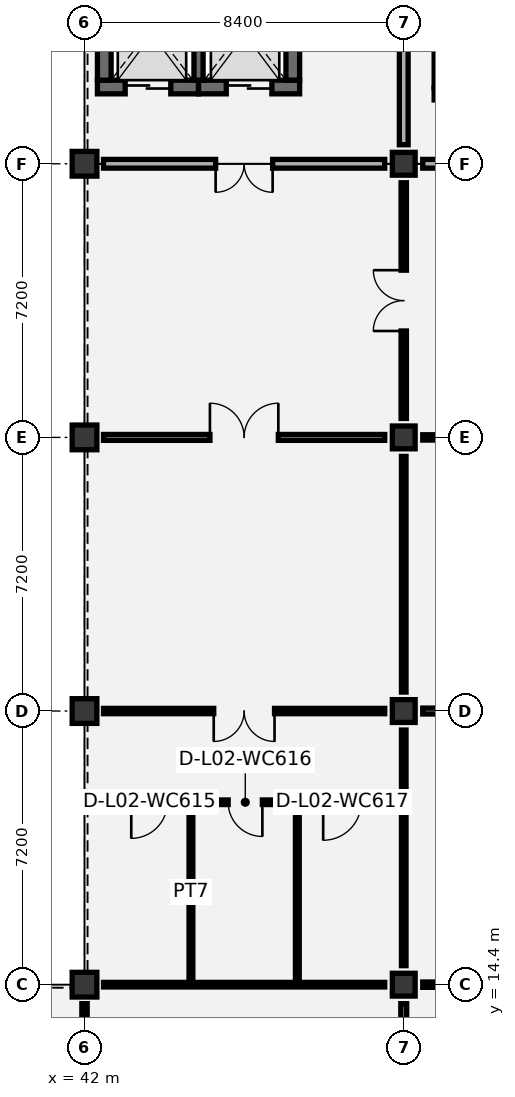
"""IFC4 building model, lengths in metres.
Left out: names, types, materials, properties, quantities, classifications, styles, units other than length and angle.
Written with IfcOpenShell. Run it as: python <this file> out.ifc"""

import sys

from ifc_helpers import new_model, si_unit, direction, frame, frame_2d, origin, origin_2d, place, context, subcontext, project, spatial, rectangle, extrude, element, fill, save


model = new_model("IFC4")
c1 = context("Model", 3, precision=1e-05, world=origin(), true_north=direction((0.0, 1.0)))
c2 = subcontext(c1, "Body", "Model", "MODEL_VIEW")
j1 = project(units=[si_unit("LENGTHUNIT", "METRE"), si_unit("PLANEANGLEUNIT", "RADIAN")], contexts=[c1])
p1 = place(None, origin())
s1 = spatial("IfcSite", under=j1, at=p1, CompositionType="ELEMENT")
p2 = place(p1, origin())
s2 = spatial("IfcBuilding", under=s1, at=p2, CompositionType="ELEMENT")
p3 = place(p2, frame((0.0, 0.0, 11.4)))
s3 = spatial("IfcBuildingStorey", under=s2, at=p3, CompositionType="ELEMENT", Elevation=11.4)
for number, where, z_axis, x_axis in (
    (1, (42.0, 14.4, 0.0), (0.0, 0.0, 1.0), (1.0, 0.0, 0.0)),
    (2, (42.0, 21.6, 0.0), (0.0, 0.0, 1.0), (1.0, 0.0, 0.0)),
    (3, (42.0, 28.8, 0.0), (0.0, 0.0, 1.0), (1.0, 0.0, 0.0)),
    (4, (42.0, 36.0, 0.0), (0.0, 0.0, 1.0), (1.0, 0.0, 0.0)),
):
    element("IfcColumn", number, at=place(p3, frame(where, z_axis=z_axis, x_axis=x_axis)), inside=s3, PredefinedType="COLUMN", context=c2, shape_type="SweptSolid", body=[
        extrude(rectangle(XDim=0.65, YDim=0.65, at=origin_2d()), origin(), (0.0, 0.0, 1.0), 5.4),
    ])
for number, where, z_axis, x_axis in (
    (5, (50.4, 14.4, 0.0), (0.0, 0.0, 1.0), (1.0, 0.0, 0.0)),
    (6, (50.4, 21.6, 0.0), (0.0, 0.0, 1.0), (1.0, 0.0, 0.0)),
    (7, (50.4, 28.8, 0.0), (0.0, 0.0, 1.0), (1.0, 0.0, 0.0)),
    (8, (50.4, 36.0, 0.0), (0.0, 0.0, 1.0), (1.0, 0.0, 0.0)),
):
    element("IfcColumn", number, at=place(p3, frame(where, z_axis=z_axis, x_axis=x_axis)), inside=s3, PredefinedType="COLUMN", context=c2, shape_type="SweptSolid", body=[
        extrude(rectangle(XDim=0.6, YDim=0.6, at=origin_2d()), origin(), (0.0, 0.0, 1.0), 5.4),
    ])
p4 = place(p3, frame((51.2, 37.84, 0.0), z_axis=(0.0, 0.0, 1.0), x_axis=(1.0, 0.0, 0.0)))
e9 = element("IfcWall", 9, at=p4, inside=s3, PredefinedType="SHEAR", context=c2, shape_type="SweptSolid", body=[
    extrude(rectangle(XDim=7.48, YDim=0.32, at=frame_2d((3.74, 0.0))), origin(), (0.0, 0.0, 1.0), 5.1),
])
p5 = place(p4, frame((0.45, 0.0, 0.0)))
e10 = element("IfcOpeningElement", 10, at=p5, cuts=e9, PredefinedType="OPENING", context=c2, shape_type="SweptSolid", body=[
    extrude(rectangle(XDim=1.05, YDim=2.15, at=frame_2d((0.525, 1.075))), frame((0.0, 0.17, 0.0), z_axis=(0.0, -1.0, 0.0), x_axis=(1.0, 0.0, 0.0)), (0.0, 0.0, 1.0), 0.34),
])
p6 = place(p3, frame((51.36, 38.0, 0.0), z_axis=(0.0, 0.0, 1.0), x_axis=(0.0, 1.0, 0.0)))
e11 = element("IfcWall", 11, at=p6, inside=s3, PredefinedType="SHEAR", context=c2, shape_type="SweptSolid", body=[
    extrude(rectangle(XDim=3.8, YDim=0.32, at=frame_2d((1.9, 0.0))), origin(), (0.0, 0.0, 1.0), 5.1),
])
p7 = place(p3, frame((42.34, 38.02, 0.0), z_axis=(0.0, 0.0, 1.0), x_axis=(1.0, 0.0, 0.0)))
e12 = element("IfcWall", 12, at=p7, inside=s3, PredefinedType="SHEAR", context=c2, shape_type="SweptSolid", body=[
    extrude(rectangle(XDim=2.66, YDim=0.36, at=frame_2d((1.33, 0.0))), origin(), (0.0, 0.0, 1.0), 5.1),
])
p8 = place(p7, frame((0.73, 0.0, 0.0)))
e13 = element("IfcOpeningElement", 13, at=p8, cuts=e12, PredefinedType="OPENING", context=c2, shape_type="SweptSolid", body=[
    extrude(rectangle(XDim=1.2, YDim=2.15, at=frame_2d((0.6, 1.075))), frame((0.0, 0.19, 0.0), z_axis=(0.0, -1.0, 0.0), x_axis=(1.0, 0.0, 0.0)), (0.0, 0.0, 1.0), 0.38),
])
p9 = place(p3, frame((45.0, 38.02, 0.0), z_axis=(0.0, 0.0, 1.0), x_axis=(1.0, 0.0, 0.0)))
e14 = element("IfcWall", 14, at=p9, inside=s3, PredefinedType="SHEAR", context=c2, shape_type="SweptSolid", body=[
    extrude(rectangle(XDim=2.66, YDim=0.36, at=frame_2d((1.33, 0.0))), origin(), (0.0, 0.0, 1.0), 5.1),
])
p10 = place(p9, frame((0.73, 0.0, 0.0)))
e15 = element("IfcOpeningElement", 15, at=p10, cuts=e14, PredefinedType="OPENING", context=c2, shape_type="SweptSolid", body=[
    extrude(rectangle(XDim=1.2, YDim=2.15, at=frame_2d((0.6, 1.075))), frame((0.0, 0.19, 0.0), z_axis=(0.0, -1.0, 0.0), x_axis=(1.0, 0.0, 0.0)), (0.0, 0.0, 1.0), 0.38),
])
for number, where, z_axis, x_axis in (
    (16, (42.52, 38.2, 0.0), (0.0, 0.0, 1.0), (0.0, 1.0, 0.0)),
    (17, (47.48, 38.2, 0.0), (0.0, 0.0, 1.0), (0.0, 1.0, 0.0)),
):
    element("IfcWall", number, at=place(p3, frame(where, z_axis=z_axis, x_axis=x_axis)), inside=s3, PredefinedType="SHEAR", context=c2, shape_type="SweptSolid", body=[
        extrude(rectangle(XDim=2.8, YDim=0.36, at=frame_2d((1.4, 0.0))), origin(), (0.0, 0.0, 1.0), 5.1),
    ])
p11 = place(p3, frame((45.0, 38.2, 0.0), z_axis=(0.0, 0.0, 1.0), x_axis=(0.0, 1.0, 0.0)))
e18 = element("IfcWall", 18, at=p11, inside=s3, PredefinedType="SHEAR", context=c2, shape_type="SweptSolid", body=[
    extrude(rectangle(XDim=2.8, YDim=0.24, at=frame_2d((1.4, 0.0))), origin(), (0.0, 0.0, 1.0), 5.1),
])
p12 = place(p3, frame((42.15, 19.2, 0.0), z_axis=(0.0, 0.0, 1.0), x_axis=(1.0, 0.0, 0.0)))
e19 = element("IfcWall", 19, at=p12, inside=s3, PredefinedType="PARTITIONING", context=c2, shape_type="SweptSolid", body=[
    extrude(rectangle(XDim=8.1, YDim=0.12, at=frame_2d((4.05, 0.0))), origin(), (0.0, 0.0, 1.0), 5.1),
])
p13 = place(p12, frame((1.08, 0.0, 0.0)))
e20 = element("IfcOpeningElement", 20, at=p13, cuts=e19, PredefinedType="OPENING", context=c2, shape_type="SweptSolid", body=[
    extrude(rectangle(XDim=0.95, YDim=2.1, at=frame_2d((0.475, 1.05))), frame((0.0, 0.07, 0.0), z_axis=(0.0, -1.0, 0.0), x_axis=(1.0, 0.0, 0.0)), (0.0, 0.0, 1.0), 0.14),
])
p14 = place(p12, frame((3.63, 0.0, 0.0)))
e21 = element("IfcOpeningElement", 21, at=p14, cuts=e19, PredefinedType="OPENING", context=c2, shape_type="SweptSolid", body=[
    extrude(rectangle(XDim=0.9, YDim=2.1, at=frame_2d((0.45, 1.05))), frame((0.0, 0.07, 0.0), z_axis=(0.0, -1.0, 0.0), x_axis=(1.0, 0.0, 0.0)), (0.0, 0.0, 1.0), 0.14),
])
p15 = place(p12, frame((6.13, 0.0, 0.0)))
e22 = element("IfcOpeningElement", 22, at=p15, cuts=e19, PredefinedType="OPENING", context=c2, shape_type="SweptSolid", body=[
    extrude(rectangle(XDim=1.0, YDim=2.1, at=frame_2d((0.5, 1.05))), frame((0.0, 0.07, 0.0), z_axis=(0.0, -1.0, 0.0), x_axis=(1.0, 0.0, 0.0)), (0.0, 0.0, 1.0), 0.14),
])
for number, where, z_axis, x_axis in (
    (23, (44.8, 14.55, 0.0), (0.0, 0.0, 1.0), (0.0, 1.0, 0.0)),
    (24, (47.6, 14.55, 0.0), (0.0, 0.0, 1.0), (0.0, 1.0, 0.0)),
):
    element("IfcWall", number, at=place(p3, frame(where, z_axis=z_axis, x_axis=x_axis)), inside=s3, PredefinedType="PARTITIONING", context=c2, shape_type="SweptSolid", body=[
        extrude(rectangle(XDim=4.59, YDim=0.1, at=frame_2d((2.295, 0.0))), origin(), (0.0, 0.0, 1.0), 5.1),
    ])
p16 = place(p3, frame((42.0, 7.7, 0.0), z_axis=(0.0, 0.0, 1.0), x_axis=(0.0, 1.0, 0.0)))
e25 = element("IfcWall", 25, at=p16, inside=s3, PredefinedType="PARTITIONING", context=c2, shape_type="SweptSolid", body=[
    extrude(rectangle(XDim=6.2, YDim=0.14, at=frame_2d((3.1, 0.0))), origin(), (0.0, 0.0, 1.0), 4.805),
])
p17 = place(p16, frame((2.2, 0.0, 0.0)))
e26 = element("IfcOpeningElement", 26, at=p17, cuts=e25, PredefinedType="OPENING", context=c2, shape_type="SweptSolid", body=[
    extrude(rectangle(XDim=1.8, YDim=2.25, at=frame_2d((0.9, 1.125))), frame((0.0, 0.08, 0.0), z_axis=(0.0, -1.0, 0.0), x_axis=(1.0, 0.0, 0.0)), (0.0, 0.0, 1.0), 0.16),
])
p18 = place(p3, frame((50.4, 7.7, 0.0), z_axis=(0.0, 0.0, 1.0), x_axis=(0.0, 1.0, 0.0)))
e27 = element("IfcWall", 27, at=p18, inside=s3, PredefinedType="PARTITIONING", context=c2, shape_type="SweptSolid", body=[
    extrude(rectangle(XDim=6.2, YDim=0.155, at=frame_2d((3.1, 0.0))), origin(), (0.0, 0.0, 1.0), 4.395),
])
p19 = place(p18, frame((2.2, 0.0, 0.0)))
e28 = element("IfcOpeningElement", 28, at=p19, cuts=e27, PredefinedType="OPENING", context=c2, shape_type="SweptSolid", body=[
    extrude(rectangle(XDim=1.8, YDim=2.25, at=frame_2d((0.9, 1.125))), frame((0.0, 0.087, 0.0), z_axis=(0.0, -1.0, 0.0), x_axis=(1.0, 0.0, 0.0)), (0.0, 0.0, 1.0), 0.175),
])
p20 = place(p3, frame((42.5, 14.4, 0.0), z_axis=(0.0, 0.0, 1.0), x_axis=(1.0, 0.0, 0.0)))
e29 = element("IfcWall", 29, at=p20, inside=s3, PredefinedType="PARTITIONING", context=c2, shape_type="SweptSolid", body=[
    extrude(rectangle(XDim=7.4, YDim=0.12, at=frame_2d((3.7, 0.0))), origin(), (0.0, 0.0, 1.0), 4.345),
])
p21 = place(p3, frame((50.4, 14.9, 0.0), z_axis=(0.0, 0.0, 1.0), x_axis=(0.0, 1.0, 0.0)))
e30 = element("IfcWall", 30, at=p21, inside=s3, PredefinedType="PARTITIONING", context=c2, shape_type="SweptSolid", body=[
    extrude(rectangle(XDim=6.2, YDim=0.12, at=frame_2d((3.1, 0.0))), origin(), (0.0, 0.0, 1.0), 4.595),
])
p22 = place(p3, frame((42.5, 21.6, 0.0), z_axis=(0.0, 0.0, 1.0), x_axis=(1.0, 0.0, 0.0)))
e31 = element("IfcWall", 31, at=p22, inside=s3, PredefinedType="PARTITIONING", context=c2, shape_type="SweptSolid", body=[
    extrude(rectangle(XDim=7.4, YDim=0.14, at=frame_2d((3.7, 0.0))), origin(), (0.0, 0.0, 1.0), 4.345),
])
p23 = place(p22, frame((2.9, 0.0, 0.0)))
e32 = element("IfcOpeningElement", 32, at=p23, cuts=e31, PredefinedType="OPENING", context=c2, shape_type="SweptSolid", body=[
    extrude(rectangle(XDim=1.6, YDim=2.2, at=frame_2d((0.8, 1.1))), frame((0.0, 0.08, 0.0), z_axis=(0.0, -1.0, 0.0), x_axis=(1.0, 0.0, 0.0)), (0.0, 0.0, 1.0), 0.16),
])
p24 = place(p3, frame((50.4, 22.1, 0.0), z_axis=(0.0, 0.0, 1.0), x_axis=(0.0, 1.0, 0.0)))
e33 = element("IfcWall", 33, at=p24, inside=s3, PredefinedType="PARTITIONING", context=c2, shape_type="SweptSolid", body=[
    extrude(rectangle(XDim=6.2, YDim=0.12, at=frame_2d((3.1, 0.0))), origin(), (0.0, 0.0, 1.0), 4.395),
])
p25 = place(p3, frame((42.5, 28.8, 0.0), z_axis=(0.0, 0.0, 1.0), x_axis=(1.0, 0.0, 0.0)))
e34 = element("IfcWall", 34, at=p25, inside=s3, PredefinedType="PARTITIONING", context=c2, shape_type="SweptSolid", body=[
    extrude(rectangle(XDim=7.4, YDim=0.155, at=frame_2d((3.7, 0.0))), origin(), (0.0, 0.0, 1.0), 4.345),
])
p26 = place(p25, frame((2.8, 0.0, 0.0)))
e35 = element("IfcOpeningElement", 35, at=p26, cuts=e34, PredefinedType="OPENING", context=c2, shape_type="SweptSolid", body=[
    extrude(rectangle(XDim=1.8, YDim=2.25, at=frame_2d((0.9, 1.125))), frame((0.0, 0.087, 0.0), z_axis=(0.0, -1.0, 0.0), x_axis=(1.0, 0.0, 0.0)), (0.0, 0.0, 1.0), 0.175),
])
p27 = place(p3, frame((50.4, 29.3, 0.0), z_axis=(0.0, 0.0, 1.0), x_axis=(0.0, 1.0, 0.0)))
e36 = element("IfcWall", 36, at=p27, inside=s3, PredefinedType="PARTITIONING", context=c2, shape_type="SweptSolid", body=[
    extrude(rectangle(XDim=6.2, YDim=0.14, at=frame_2d((3.1, 0.0))), origin(), (0.0, 0.0, 1.0), 4.695),
])
p28 = place(p27, frame((2.3, 0.0, 0.0)))
e37 = element("IfcOpeningElement", 37, at=p28, cuts=e36, PredefinedType="OPENING", context=c2, shape_type="SweptSolid", body=[
    extrude(rectangle(XDim=1.6, YDim=2.2, at=frame_2d((0.8, 1.1))), frame((0.0, 0.08, 0.0), z_axis=(0.0, -1.0, 0.0), x_axis=(1.0, 0.0, 0.0)), (0.0, 0.0, 1.0), 0.16),
])
p29 = place(p3, frame((42.5, 36.0, 0.0), z_axis=(0.0, 0.0, 1.0), x_axis=(1.0, 0.0, 0.0)))
e38 = element("IfcWall", 38, at=p29, inside=s3, PredefinedType="PARTITIONING", context=c2, shape_type="SweptSolid", body=[
    extrude(rectangle(XDim=7.4, YDim=0.23, at=frame_2d((3.7, 0.0))), origin(), (0.0, 0.0, 1.0), 4.345),
])
p30 = place(p29, frame((2.95, 0.0, 0.0)))
e39 = element("IfcOpeningElement", 39, at=p30, cuts=e38, PredefinedType="OPENING", context=c2, shape_type="SweptSolid", body=[
    extrude(rectangle(XDim=1.5, YDim=2.15, at=frame_2d((0.75, 1.075))), frame((0.0, 0.125, 0.0), z_axis=(0.0, -1.0, 0.0), x_axis=(1.0, 0.0, 0.0)), (0.0, 0.0, 1.0), 0.25),
])
p31 = place(p3, frame((50.4, 36.5, 0.0), z_axis=(0.0, 0.0, 1.0), x_axis=(0.0, 1.0, 0.0)))
e40 = element("IfcWall", 40, at=p31, inside=s3, PredefinedType="PARTITIONING", context=c2, shape_type="SweptSolid", body=[
    extrude(rectangle(XDim=6.2, YDim=0.23, at=frame_2d((3.1, 0.0))), origin(), (0.0, 0.0, 1.0), 4.395),
])
p32 = place(p3, frame((50.9, 14.4, 0.0), z_axis=(0.0, 0.0, 1.0), x_axis=(1.0, 0.0, 0.0)))
e41 = element("IfcWall", 41, at=p32, inside=s3, PredefinedType="PARTITIONING", context=c2, shape_type="SweptSolid", body=[
    extrude(rectangle(XDim=7.4, YDim=0.14, at=frame_2d((3.7, 0.0))), origin(), (0.0, 0.0, 1.0), 4.345),
])
p33 = place(p32, frame((2.8, 0.0, 0.0)))
e42 = element("IfcOpeningElement", 42, at=p33, cuts=e41, PredefinedType="OPENING", context=c2, shape_type="SweptSolid", body=[
    extrude(rectangle(XDim=1.8, YDim=2.25, at=frame_2d((0.9, 1.125))), frame((0.0, 0.08, 0.0), z_axis=(0.0, -1.0, 0.0), x_axis=(1.0, 0.0, 0.0)), (0.0, 0.0, 1.0), 0.16),
])
p34 = place(p3, frame((50.9, 21.6, 0.0), z_axis=(0.0, 0.0, 1.0), x_axis=(1.0, 0.0, 0.0)))
e43 = element("IfcWall", 43, at=p34, inside=s3, PredefinedType="PARTITIONING", context=c2, shape_type="SweptSolid", body=[
    extrude(rectangle(XDim=7.4, YDim=0.155, at=frame_2d((3.7, 0.0))), origin(), (0.0, 0.0, 1.0), 4.345),
])
p35 = place(p34, frame((2.9, 0.0, 0.0)))
e44 = element("IfcOpeningElement", 44, at=p35, cuts=e43, PredefinedType="OPENING", context=c2, shape_type="SweptSolid", body=[
    extrude(rectangle(XDim=1.6, YDim=2.2, at=frame_2d((0.8, 1.1))), frame((0.0, 0.087, 0.0), z_axis=(0.0, -1.0, 0.0), x_axis=(1.0, 0.0, 0.0)), (0.0, 0.0, 1.0), 0.175),
])
p36 = place(p3, frame((50.9, 28.8, 0.0), z_axis=(0.0, 0.0, 1.0), x_axis=(1.0, 0.0, 0.0)))
e45 = element("IfcWall", 45, at=p36, inside=s3, PredefinedType="PARTITIONING", context=c2, shape_type="SweptSolid", body=[
    extrude(rectangle(XDim=7.4, YDim=0.14, at=frame_2d((3.7, 0.0))), origin(), (0.0, 0.0, 1.0), 4.345),
])
p37 = place(p36, frame((2.8, 0.0, 0.0)))
e46 = element("IfcOpeningElement", 46, at=p37, cuts=e45, PredefinedType="OPENING", context=c2, shape_type="SweptSolid", body=[
    extrude(rectangle(XDim=1.8, YDim=2.25, at=frame_2d((0.9, 1.125))), frame((0.0, 0.08, 0.0), z_axis=(0.0, -1.0, 0.0), x_axis=(1.0, 0.0, 0.0)), (0.0, 0.0, 1.0), 0.16),
])
p38 = place(p3, frame((50.9, 36.0, 0.0), z_axis=(0.0, 0.0, 1.0), x_axis=(1.0, 0.0, 0.0)))
e47 = element("IfcWall", 47, at=p38, inside=s3, PredefinedType="PARTITIONING", context=c2, shape_type="SweptSolid", body=[
    extrude(rectangle(XDim=7.4, YDim=0.23, at=frame_2d((3.7, 0.0))), origin(), (0.0, 0.0, 1.0), 4.345),
])
p39 = place(p38, frame((2.95, 0.0, 0.0)))
e48 = element("IfcOpeningElement", 48, at=p39, cuts=e47, PredefinedType="OPENING", context=c2, shape_type="SweptSolid", body=[
    extrude(rectangle(XDim=1.5, YDim=2.15, at=frame_2d((0.75, 1.075))), frame((0.0, 0.125, 0.0), z_axis=(0.0, -1.0, 0.0), x_axis=(1.0, 0.0, 0.0)), (0.0, 0.0, 1.0), 0.25),
])
p40 = place(p8, origin())
e49 = element("IfcDoor", 49, at=p40, inside=s3, OperationType="DOUBLE_DOOR_SLIDING", PredefinedType="DOOR", context=c2, shape_type="SweptSolid", body=[
    extrude(rectangle(XDim=1.2, YDim=2.15, at=frame_2d((0.6, 1.075))), frame((0.0, 0.025, 0.0), z_axis=(0.0, -1.0, 0.0), x_axis=(1.0, 0.0, 0.0)), (0.0, 0.0, 1.0), 0.05),
])
fill(e13, e49)
p41 = place(p10, origin())
e50 = element("IfcDoor", 50, at=p41, inside=s3, OperationType="DOUBLE_DOOR_SLIDING", PredefinedType="DOOR", context=c2, shape_type="SweptSolid", body=[
    extrude(rectangle(XDim=1.2, YDim=2.15, at=frame_2d((0.6, 1.075))), frame((0.0, 0.025, 0.0), z_axis=(0.0, -1.0, 0.0), x_axis=(1.0, 0.0, 0.0)), (0.0, 0.0, 1.0), 0.05),
])
fill(e15, e50)
p42 = place(p13, frame((0.95, 0.0, 0.0), z_axis=(0.0, 0.0, 1.0), x_axis=(-1.0, 0.0, 0.0)))
e51 = element("IfcDoor", 51, at=p42, inside=s3, OperationType="SINGLE_SWING_RIGHT", PredefinedType="DOOR", context=c2, shape_type="SweptSolid", body=[
    extrude(rectangle(XDim=0.95, YDim=2.1, at=frame_2d((0.475, 1.05))), frame((0.0, 0.025, 0.0), z_axis=(0.0, -1.0, 0.0), x_axis=(1.0, 0.0, 0.0)), (0.0, 0.0, 1.0), 0.05),
])
fill(e20, e51)
p43 = place(p14, frame((0.9, 0.0, 0.0), z_axis=(0.0, 0.0, 1.0), x_axis=(-1.0, 0.0, 0.0)))
e52 = element("IfcDoor", 52, at=p43, inside=s3, OperationType="SINGLE_SWING_LEFT", PredefinedType="DOOR", context=c2, shape_type="SweptSolid", body=[
    extrude(rectangle(XDim=0.9, YDim=2.1, at=frame_2d((0.45, 1.05))), frame((0.0, 0.025, 0.0), z_axis=(0.0, -1.0, 0.0), x_axis=(1.0, 0.0, 0.0)), (0.0, 0.0, 1.0), 0.05),
])
fill(e21, e52)
p44 = place(p15, frame((1.0, 0.0, 0.0), z_axis=(0.0, 0.0, 1.0), x_axis=(-1.0, 0.0, 0.0)))
e53 = element("IfcDoor", 53, at=p44, inside=s3, OperationType="SINGLE_SWING_RIGHT", PredefinedType="DOOR", context=c2, shape_type="SweptSolid", body=[
    extrude(rectangle(XDim=1.0, YDim=2.1, at=frame_2d((0.5, 1.05))), frame((0.0, 0.025, 0.0), z_axis=(0.0, -1.0, 0.0), x_axis=(1.0, 0.0, 0.0)), (0.0, 0.0, 1.0), 0.05),
])
fill(e22, e53)
p45 = place(p23, frame((1.6, 0.0, 0.0), z_axis=(0.0, 0.0, 1.0), x_axis=(-1.0, 0.0, 0.0)))
e54 = element("IfcDoor", 54, at=p45, inside=s3, OperationType="DOUBLE_DOOR_SINGLE_SWING", PredefinedType="DOOR", context=c2, shape_type="SweptSolid", body=[
    extrude(rectangle(XDim=1.6, YDim=2.2, at=frame_2d((0.8, 1.1))), frame((0.0, 0.025, 0.0), z_axis=(0.0, -1.0, 0.0), x_axis=(1.0, 0.0, 0.0)), (0.0, 0.0, 1.0), 0.05),
])
fill(e32, e54)
p46 = place(p26, origin())
e55 = element("IfcDoor", 55, at=p46, inside=s3, OperationType="DOUBLE_DOOR_SINGLE_SWING", PredefinedType="DOOR", context=c2, shape_type="SweptSolid", body=[
    extrude(rectangle(XDim=1.8, YDim=2.25, at=frame_2d((0.9, 1.125))), frame((0.0, 0.025, 0.0), z_axis=(0.0, -1.0, 0.0), x_axis=(1.0, 0.0, 0.0)), (0.0, 0.0, 1.0), 0.05),
])
fill(e35, e55)
p47 = place(p28, origin())
e56 = element("IfcDoor", 56, at=p47, inside=s3, OperationType="DOUBLE_DOOR_SINGLE_SWING", PredefinedType="DOOR", context=c2, shape_type="SweptSolid", body=[
    extrude(rectangle(XDim=1.6, YDim=2.2, at=frame_2d((0.8, 1.1))), frame((0.0, 0.025, 0.0), z_axis=(0.0, -1.0, 0.0), x_axis=(1.0, 0.0, 0.0)), (0.0, 0.0, 1.0), 0.05),
])
fill(e37, e56)
p48 = place(p30, frame((1.5, 0.0, 0.0), z_axis=(0.0, 0.0, 1.0), x_axis=(-1.0, 0.0, 0.0)))
e57 = element("IfcDoor", 57, at=p48, inside=s3, OperationType="DOUBLE_DOOR_SINGLE_SWING", PredefinedType="DOOR", context=c2, shape_type="SweptSolid", body=[
    extrude(rectangle(XDim=1.5, YDim=2.15, at=frame_2d((0.75, 1.075))), frame((0.0, 0.025, 0.0), z_axis=(0.0, -1.0, 0.0), x_axis=(1.0, 0.0, 0.0)), (0.0, 0.0, 1.0), 0.05),
])
fill(e39, e57)
save(model, sys.argv[1])
